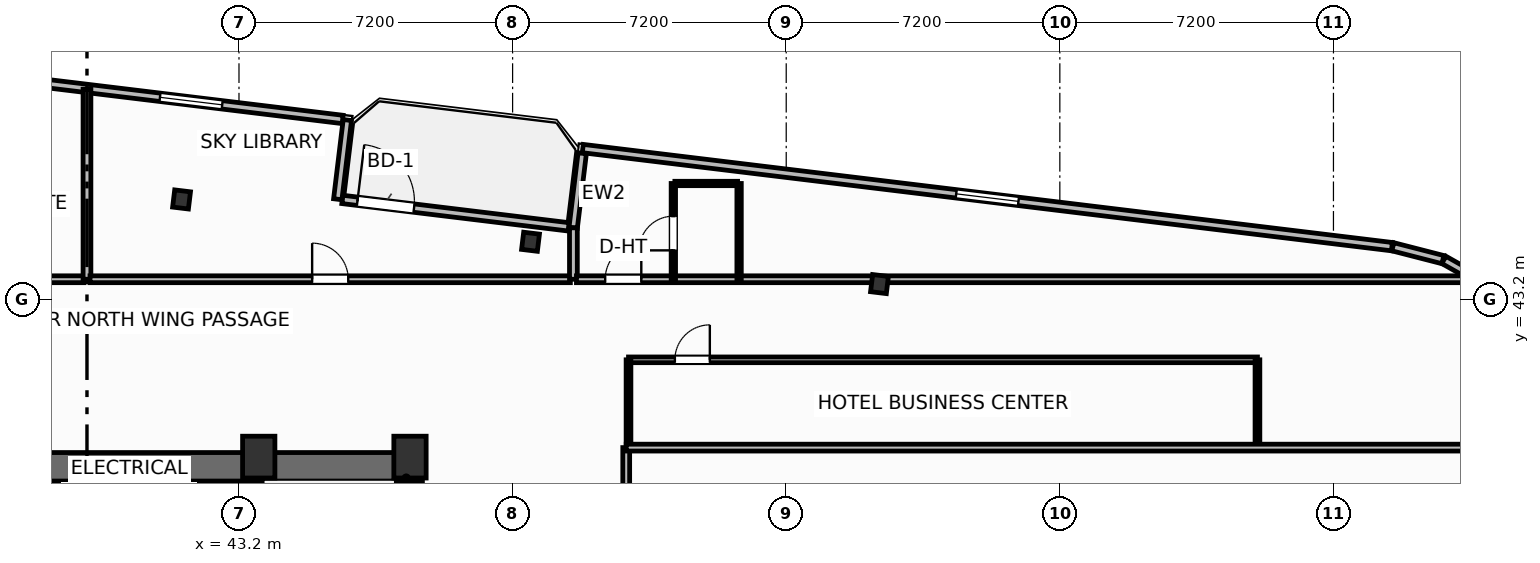
"""IFC4 building model, lengths in metres.
Left out: names, types, materials, properties, quantities, classifications, styles, units other than length and angle.
Written with IfcOpenShell. Run it as: python <this file> out.ifc"""

import sys

from ifc_helpers import new_model, si_unit, direction, frame, frame_2d, origin, origin_2d, place, context, subcontext, project, spatial, rectangle, i_section, extrude, element, fill, save


model = new_model("IFC4")
c1 = context("Model", 3, precision=1e-05, world=origin(), true_north=direction((0.0, 1.0)))
c2 = subcontext(c1, "Body", "Model", "MODEL_VIEW")
j1 = project(units=[si_unit("LENGTHUNIT", "METRE"), si_unit("PLANEANGLEUNIT", "RADIAN")], contexts=[c1])
p1 = place(None, origin())
s1 = spatial("IfcSite", under=j1, at=p1, CompositionType="ELEMENT")
p2 = place(p1, origin())
s2 = spatial("IfcBuilding", under=s1, at=p2, CompositionType="ELEMENT")
p3 = place(p2, frame((0.0, 0.0, 147.6)))
s3 = spatial("IfcBuildingStorey", under=s2, at=p3, CompositionType="ELEMENT", Elevation=147.6)
for number, where, z_axis, x_axis in (
    (1, (43.72, 39.05, 0.0), (0.0, 0.0, 1.0), (1.0, 0.0, 0.0)),
    (2, (47.7, 39.05, 0.0), (0.0, 0.0, 1.0), (1.0, 0.0, 0.0)),
):
    element("IfcColumn", number, at=place(p3, frame(where, z_axis=z_axis, x_axis=x_axis)), inside=s3, PredefinedType="COLUMN", context=c2, shape_type="SweptSolid", body=[
        extrude(rectangle(XDim=0.85, YDim=1.1, at=origin_2d()), origin(), (0.0, 0.0, 1.0), 3.7),
    ])
p4 = place(p3, frame((30.38, 38.795, 0.0), z_axis=(0.0, 0.0, 1.0), x_axis=(1.0, 0.0, 0.0)))
e3 = element("IfcWall", 3, at=p4, inside=s3, PredefinedType="SHEAR", context=c2, shape_type="SweptSolid", body=[
    extrude(rectangle(XDim=17.64, YDim=0.75, at=frame_2d((8.82, 0.0))), origin(), (0.0, 0.0, 1.0), 3.45),
])
p5 = place(p3, frame((47.645, 29.2, 0.0), z_axis=(0.0, 0.0, 1.0), x_axis=(0.0, 1.0, 0.0)))
e4 = element("IfcWall", 4, at=p5, inside=s3, PredefinedType="SHEAR", context=c2, shape_type="SweptSolid", body=[
    extrude(rectangle(XDim=9.22, YDim=0.75, at=frame_2d((4.61, 0.0))), origin(), (0.0, 0.0, 1.0), 3.45),
])
p6 = place(p3, frame((43.76, 29.2, 0.0), z_axis=(0.0, 0.0, 1.0), x_axis=(0.0, 1.0, 0.0)))
e5 = element("IfcWall", 5, at=p6, inside=s3, PredefinedType="SHEAR", context=c2, shape_type="SweptSolid", body=[
    extrude(rectangle(XDim=9.22, YDim=0.25, at=frame_2d((4.61, 0.0))), origin(), (0.0, 0.0, 1.0), 3.45),
])
p7 = place(p6, frame((0.65, 0.0, 0.0)))
e6 = element("IfcOpeningElement", 6, at=p7, cuts=e5, PredefinedType="OPENING", context=c2, shape_type="SweptSolid", body=[
    extrude(rectangle(XDim=1.05, YDim=2.15, at=frame_2d((0.525, 1.075))), frame((0.0, 0.135, 0.0), z_axis=(0.0, -1.0, 0.0), x_axis=(1.0, 0.0, 0.0)), (0.0, 0.0, 1.0), 0.27),
])
for number, where, z_axis, x_axis in (
    (7, (60.054, 43.603, 0.0), (0.0, 0.0, 1.0), (0.993, -0.12, 0.0)),
    (8, (50.872, 44.717, 0.0), (0.0, 0.0, 1.0), (0.993, -0.12, 0.0)),
    (9, (41.689, 45.83, 0.0), (0.0, 0.0, 1.0), (0.993, -0.12, 0.0)),
):
    element("IfcColumn", number, at=place(p3, frame(where, z_axis=z_axis, x_axis=x_axis)), inside=s3, PredefinedType="COLUMN", context=c2, shape_type="SweptSolid", body=[
        extrude(i_section(OverallWidth=0.418, OverallDepth=0.455, WebThickness=0.042, FlangeThickness=0.068, FilletRadius=0.025, at=origin_2d()), origin(), (0.0, 0.0, 1.0), 3.7),
    ])
p8 = place(p3, frame((45.92, 45.831, 0.0), z_axis=(0.0, 0.0, 1.0), x_axis=(0.992729951822, -0.120362962556, 0.0)))
e10 = element("IfcWall", 10, at=p8, inside=s3, PredefinedType="SOLIDWALL", context=c2, shape_type="SweptSolid", body=[
    extrude(rectangle(XDim=6.0, YDim=0.22, at=frame_2d((3.0, 0.0))), origin(), (0.0, 0.0, 1.0), 2.73),
])
p9 = place(p8, frame((0.4, 0.0, 0.0)))
e11 = element("IfcOpeningElement", 11, at=p9, cuts=e10, PredefinedType="OPENING", context=c2, shape_type="SweptSolid", body=[
    extrude(rectangle(XDim=1.5, YDim=2.25, at=frame_2d((0.75, 1.125))), frame((0.0, 0.12, 0.0), z_axis=(0.0, -1.0, 0.0), x_axis=(1.0, 0.0, 0.0)), (0.0, 0.0, 1.0), 0.24),
])
p10 = place(p3, frame((76.084, 43.575, 0.0), z_axis=(0.0, 0.0, 1.0), x_axis=(-0.871093268227, 0.491117621399, 0.0)))
e12 = element("IfcWall", 12, at=p10, inside=s3, PredefinedType="SOLIDWALL", context=c2, shape_type="SweptSolid", body=[
    extrude(rectangle(XDim=1.353, YDim=0.22, at=frame_2d((0.677, 0.0))), origin(), (0.0, 0.0, 1.0), 2.73),
])
p11 = place(p3, frame((74.881, 44.246, 0.0), z_axis=(0.0, 0.0, 1.0), x_axis=(-0.968549775063, 0.248819881091, 0.0)))
e13 = element("IfcWall", 13, at=p11, inside=s3, PredefinedType="SOLIDWALL", context=c2, shape_type="SweptSolid", body=[
    extrude(rectangle(XDim=1.361, YDim=0.22, at=frame_2d((0.68, 0.0))), origin(), (0.0, 0.0, 1.0), 2.73),
])
p12 = place(p3, frame((73.538, 44.588, 0.0), z_axis=(0.0, 0.0, 1.0), x_axis=(-0.992733493583, 0.120333747213, 0.0)))
e14 = element("IfcWall", 14, at=p12, inside=s3, PredefinedType="SOLIDWALL", context=c2, shape_type="SweptSolid", body=[
    extrude(rectangle(XDim=21.447, YDim=0.22, at=frame_2d((10.724, 0.0))), origin(), (0.0, 0.0, 1.0), 2.73),
])
p13 = place(p12, frame((9.899, 0.0, 0.8)))
e15 = element("IfcOpeningElement", 15, at=p13, cuts=e14, PredefinedType="OPENING", context=c2, shape_type="SweptSolid", body=[
    extrude(rectangle(XDim=1.65, YDim=1.65, at=frame_2d((0.825, 0.825))), frame((0.0, 0.12, 0.0), z_axis=(0.0, -1.0, 0.0), x_axis=(1.0, 0.0, 0.0)), (0.0, 0.0, 1.0), 0.24),
])
p14 = place(p3, frame((52.231, 47.045, 0.0), z_axis=(0.0, 0.0, 1.0), x_axis=(-0.120275992932, -0.992740492538, 0.0)))
e16 = element("IfcWall", 16, at=p14, inside=s3, PredefinedType="SOLIDWALL", context=c2, shape_type="SweptSolid", body=[
    extrude(rectangle(XDim=1.975, YDim=0.22, at=frame_2d((0.988, 0.0))), origin(), (0.0, 0.0, 1.0), 2.73),
])
p15 = place(p3, frame((45.799, 45.835, 0.0), z_axis=(0.0, 0.0, 1.0), x_axis=(0.120314009587, 0.992735885871, 0.0)))
e17 = element("IfcWall", 17, at=p15, inside=s3, PredefinedType="SOLIDWALL", context=c2, shape_type="SweptSolid", body=[
    extrude(rectangle(XDim=2.1, YDim=0.22, at=frame_2d((1.05, 0.0))), origin(), (0.0, 0.0, 1.0), 2.73),
])
p16 = place(p3, frame((45.928, 47.935, 0.0), z_axis=(0.0, 0.0, 1.0), x_axis=(-0.992730591876, 0.120357683402, 0.0)))
e18 = element("IfcWall", 18, at=p16, inside=s3, PredefinedType="SOLIDWALL", context=c2, shape_type="SweptSolid", body=[
    extrude(rectangle(XDim=8.035, YDim=0.22, at=frame_2d((4.017, 0.0))), origin(), (0.0, 0.0, 1.0), 2.73),
])
p17 = place(p16, frame((3.192, 0.0, 0.8)))
e19 = element("IfcOpeningElement", 19, at=p17, cuts=e18, PredefinedType="OPENING", context=c2, shape_type="SweptSolid", body=[
    extrude(rectangle(XDim=1.65, YDim=1.65, at=frame_2d((0.825, 0.825))), frame((0.0, 0.12, 0.0), z_axis=(0.0, -1.0, 0.0), x_axis=(1.0, 0.0, 0.0)), (0.0, 0.0, 1.0), 0.24),
])
p18 = place(p3, frame((53.45, 41.61, 0.0), z_axis=(0.0, 0.0, 1.0), x_axis=(1.0, 0.0, 0.0)))
e20 = element("IfcWall", 20, at=p18, inside=s3, PredefinedType="PARTITIONING", context=c2, shape_type="SweptSolid", body=[
    extrude(rectangle(XDim=16.55, YDim=0.15, at=frame_2d((8.275, 0.0))), origin(), (0.0, 0.0, 1.0), 3.45),
])
p19 = place(p18, frame((1.22, 0.0, 0.0)))
e21 = element("IfcOpeningElement", 21, at=p19, cuts=e20, PredefinedType="OPENING", context=c2, shape_type="SweptSolid", body=[
    extrude(rectangle(XDim=0.92, YDim=2.05, at=frame_2d((0.46, 1.025))), frame((0.0, 0.085, 0.0), z_axis=(0.0, -1.0, 0.0), x_axis=(1.0, 0.0, 0.0)), (0.0, 0.0, 1.0), 0.17),
])
for number, where, z_axis, x_axis in (
    (22, (53.45, 39.3, 0.0), (0.0, 0.0, 1.0), (0.0, 1.0, 0.0)),
    (23, (70.0, 39.3, 0.0), (0.0, 0.0, 1.0), (0.0, 1.0, 0.0)),
):
    element("IfcWall", number, at=place(p3, frame(where, z_axis=z_axis, x_axis=x_axis)), inside=s3, PredefinedType="PARTITIONING", context=c2, shape_type="SweptSolid", body=[
        extrude(rectangle(XDim=2.31, YDim=0.125, at=frame_2d((1.155, 0.0))), origin(), (0.0, 0.0, 1.0), 3.45),
    ])
p20 = place(p3, frame((25.08, 43.73, 0.0), z_axis=(0.0, 0.0, 1.0), x_axis=(1.0, 0.0, 0.0)))
e24 = element("IfcWall", 24, at=p20, inside=s3, PredefinedType="PARTITIONING", context=c2, shape_type="SweptSolid", body=[
    extrude(rectangle(XDim=14.04, YDim=0.18, at=frame_2d((7.02, 0.0))), origin(), (0.0, 0.0, 1.0), 2.972),
])
p21 = place(p20, frame((3.23, 0.0, 0.0)))
e25 = element("IfcOpeningElement", 25, at=p21, cuts=e24, PredefinedType="OPENING", context=c2, shape_type="SweptSolid", body=[
    extrude(rectangle(XDim=0.95, YDim=2.15, at=frame_2d((0.475, 1.075))), frame((0.0, 0.1, 0.0), z_axis=(0.0, -1.0, 0.0), x_axis=(1.0, 0.0, 0.0)), (0.0, 0.0, 1.0), 0.2),
])
p22 = place(p3, frame((39.2, 43.73, 0.0), z_axis=(0.0, 0.0, 1.0), x_axis=(0.0, 1.0, 0.0)))
e26 = element("IfcWall", 26, at=p22, inside=s3, PredefinedType="PARTITIONING", context=c2, shape_type="SweptSolid", body=[
    extrude(rectangle(XDim=5.0, YDim=0.205, at=frame_2d((2.5, 0.0))), origin(), (0.0, 0.0, 1.0), 3.45),
])
p23 = place(p3, frame((39.28, 43.73, 0.0), z_axis=(0.0, 0.0, 1.0), x_axis=(1.0, 0.0, 0.0)))
e27 = element("IfcWall", 27, at=p23, inside=s3, PredefinedType="PARTITIONING", context=c2, shape_type="SweptSolid", body=[
    extrude(rectangle(XDim=12.64, YDim=0.18, at=frame_2d((6.32, 0.0))), origin(), (0.0, 0.0, 1.0), 2.972),
])
p24 = place(p23, frame((5.845, 0.0, 0.0)))
e28 = element("IfcOpeningElement", 28, at=p24, cuts=e27, PredefinedType="OPENING", context=c2, shape_type="SweptSolid", body=[
    extrude(rectangle(XDim=0.95, YDim=2.05, at=frame_2d((0.475, 1.025))), frame((0.0, 0.1, 0.0), z_axis=(0.0, -1.0, 0.0), x_axis=(1.0, 0.0, 0.0)), (0.0, 0.0, 1.0), 0.2),
])
p25 = place(p3, frame((52.0, 43.73, 0.0), z_axis=(0.0, 0.0, 1.0), x_axis=(0.0, 1.0, 0.0)))
e29 = element("IfcWall", 29, at=p25, inside=s3, PredefinedType="PARTITIONING", context=c2, shape_type="SweptSolid", body=[
    extrude(rectangle(XDim=1.354, YDim=0.205, at=frame_2d((0.677, 0.0))), origin(), (0.0, 0.0, 1.0), 3.45),
])
p26 = place(p3, frame((52.08, 43.73, 0.0), z_axis=(0.0, 0.0, 1.0), x_axis=(1.0, 0.0, 0.0)))
e30 = element("IfcWall", 30, at=p26, inside=s3, PredefinedType="PARTITIONING", context=c2, shape_type="SweptSolid", body=[
    extrude(rectangle(XDim=23.689, YDim=0.18, at=frame_2d((11.845, 0.0))), origin(), (0.0, 0.0, 1.0), 2.824),
])
p27 = place(p26, frame((0.756, 0.0, 0.0)))
e31 = element("IfcOpeningElement", 31, at=p27, cuts=e30, PredefinedType="OPENING", context=c2, shape_type="SweptSolid", body=[
    extrude(rectangle(XDim=0.95, YDim=2.15, at=frame_2d((0.475, 1.075))), frame((0.0, 0.1, 0.0), z_axis=(0.0, -1.0, 0.0), x_axis=(1.0, 0.0, 0.0)), (0.0, 0.0, 1.0), 0.2),
])
p28 = place(p3, frame((54.67, 46.25, 0.0), z_axis=(0.0, 0.0, 1.0), x_axis=(1.0, 0.0, 0.0)))
e32 = element("IfcWall", 32, at=p28, inside=s3, PredefinedType="PARTITIONING", context=c2, shape_type="SweptSolid", body=[
    extrude(rectangle(XDim=1.65, YDim=0.115, at=frame_2d((0.825, 0.0))), origin(), (0.0, 0.0, 1.0), 3.45),
])
p29 = place(p3, frame((54.63, 43.73, 0.0), z_axis=(0.0, 0.0, 1.0), x_axis=(0.0, 1.0, 0.0)))
e33 = element("IfcWall", 33, at=p29, inside=s3, PredefinedType="PARTITIONING", context=c2, shape_type="SweptSolid", body=[
    extrude(rectangle(XDim=2.52, YDim=0.115, at=frame_2d((1.26, 0.0))), origin(), (0.0, 0.0, 1.0), 3.45),
])
p30 = place(p29, frame((0.76, 0.0, 0.0)))
e34 = element("IfcOpeningElement", 34, at=p30, cuts=e33, PredefinedType="OPENING", context=c2, shape_type="SweptSolid", body=[
    extrude(rectangle(XDim=0.9, YDim=2.05, at=frame_2d((0.45, 1.025))), frame((0.0, 0.067, 0.0), z_axis=(0.0, -1.0, 0.0), x_axis=(1.0, 0.0, 0.0)), (0.0, 0.0, 1.0), 0.135),
])
p31 = place(p3, frame((56.36, 43.73, 0.0), z_axis=(0.0, 0.0, 1.0), x_axis=(0.0, 1.0, 0.0)))
e35 = element("IfcWall", 35, at=p31, inside=s3, PredefinedType="PARTITIONING", context=c2, shape_type="SweptSolid", body=[
    extrude(rectangle(XDim=2.52, YDim=0.115, at=frame_2d((1.26, 0.0))), origin(), (0.0, 0.0, 1.0), 3.45),
])
p32 = place(p3, frame((53.39, 26.84, 0.0), z_axis=(0.0, 0.0, 1.0), x_axis=(0.0, 1.0, 0.0)))
e36 = element("IfcWall", 36, at=p32, inside=s3, PredefinedType="PARTITIONING", context=c2, shape_type="SweptSolid", body=[
    extrude(rectangle(XDim=12.46, YDim=0.18, at=frame_2d((6.23, 0.0))), origin(), (0.0, 0.0, 1.0), 3.45),
])
p33 = place(p32, frame((0.618, 0.0, 0.0)))
e37 = element("IfcOpeningElement", 37, at=p33, cuts=e36, PredefinedType="OPENING", context=c2, shape_type="SweptSolid", body=[
    extrude(rectangle(XDim=0.92, YDim=2.05, at=frame_2d((0.46, 1.025))), frame((0.0, 0.1, 0.0), z_axis=(0.0, -1.0, 0.0), x_axis=(1.0, 0.0, 0.0)), (0.0, 0.0, 1.0), 0.2),
])
p34 = place(p3, frame((53.39, 39.3, 0.0), z_axis=(0.0, 0.0, 1.0), x_axis=(1.0, 0.0, 0.0)))
e38 = element("IfcWall", 38, at=p34, inside=s3, PredefinedType="PARTITIONING", context=c2, shape_type="SweptSolid", body=[
    extrude(rectangle(XDim=24.74, YDim=0.18, at=frame_2d((12.37, 0.0))), origin(), (0.0, 0.0, 1.0), 3.45),
])
p35 = place(p9, origin())
e39 = element("IfcDoor", 39, at=p35, inside=s3, OperationType="SINGLE_SWING_LEFT", PredefinedType="DOOR", context=c2, shape_type="SweptSolid", body=[
    extrude(rectangle(XDim=1.5, YDim=2.25, at=frame_2d((0.75, 1.125))), frame((0.0, 0.025, 0.0), z_axis=(0.0, -1.0, 0.0), x_axis=(1.0, 0.0, 0.0)), (0.0, 0.0, 1.0), 0.05),
])
fill(e11, e39)
p36 = place(p13, origin())
e40 = element("IfcWindow", 40, at=p36, inside=s3, PartitioningType="SINGLE_PANEL", PredefinedType="WINDOW", context=c2, shape_type="SweptSolid", body=[
    extrude(rectangle(XDim=1.65, YDim=1.65, at=frame_2d((0.825, 0.825))), frame((0.0, 0.03, 0.0), z_axis=(0.0, -1.0, 0.0), x_axis=(1.0, 0.0, 0.0)), (0.0, 0.0, 1.0), 0.06),
])
fill(e15, e40)
p37 = place(p17, origin())
e41 = element("IfcWindow", 41, at=p37, inside=s3, PartitioningType="SINGLE_PANEL", PredefinedType="WINDOW", context=c2, shape_type="SweptSolid", body=[
    extrude(rectangle(XDim=1.65, YDim=1.65, at=frame_2d((0.825, 0.825))), frame((0.0, 0.03, 0.0), z_axis=(0.0, -1.0, 0.0), x_axis=(1.0, 0.0, 0.0)), (0.0, 0.0, 1.0), 0.06),
])
fill(e19, e41)
p38 = place(p19, origin())
e42 = element("IfcDoor", 42, at=p38, inside=s3, OperationType="SINGLE_SWING_RIGHT", PredefinedType="DOOR", context=c2, shape_type="SweptSolid", body=[
    extrude(rectangle(XDim=0.92, YDim=2.05, at=frame_2d((0.46, 1.025))), frame((0.0, 0.025, 0.0), z_axis=(0.0, -1.0, 0.0), x_axis=(1.0, 0.0, 0.0)), (0.0, 0.0, 1.0), 0.05),
])
fill(e21, e42)
p39 = place(p24, origin())
e43 = element("IfcDoor", 43, at=p39, inside=s3, OperationType="SINGLE_SWING_LEFT", PredefinedType="DOOR", context=c2, shape_type="SweptSolid", body=[
    extrude(rectangle(XDim=0.95, YDim=2.05, at=frame_2d((0.475, 1.025))), frame((0.0, 0.025, 0.0), z_axis=(0.0, -1.0, 0.0), x_axis=(1.0, 0.0, 0.0)), (0.0, 0.0, 1.0), 0.05),
])
fill(e28, e43)
p40 = place(p27, origin())
e44 = element("IfcDoor", 44, at=p40, inside=s3, OperationType="SINGLE_SWING_RIGHT", PredefinedType="DOOR", context=c2, shape_type="SweptSolid", body=[
    extrude(rectangle(XDim=0.95, YDim=2.15, at=frame_2d((0.475, 1.075))), frame((0.0, 0.025, 0.0), z_axis=(0.0, -1.0, 0.0), x_axis=(1.0, 0.0, 0.0)), (0.0, 0.0, 1.0), 0.05),
])
fill(e31, e44)
p41 = place(p30, origin())
e45 = element("IfcDoor", 45, at=p41, inside=s3, OperationType="SINGLE_SWING_LEFT", PredefinedType="DOOR", context=c2, shape_type="SweptSolid", body=[
    extrude(rectangle(XDim=0.9, YDim=2.05, at=frame_2d((0.45, 1.025))), frame((0.0, 0.025, 0.0), z_axis=(0.0, -1.0, 0.0), x_axis=(1.0, 0.0, 0.0)), (0.0, 0.0, 1.0), 0.05),
])
fill(e34, e45)
save(model, sys.argv[1])
